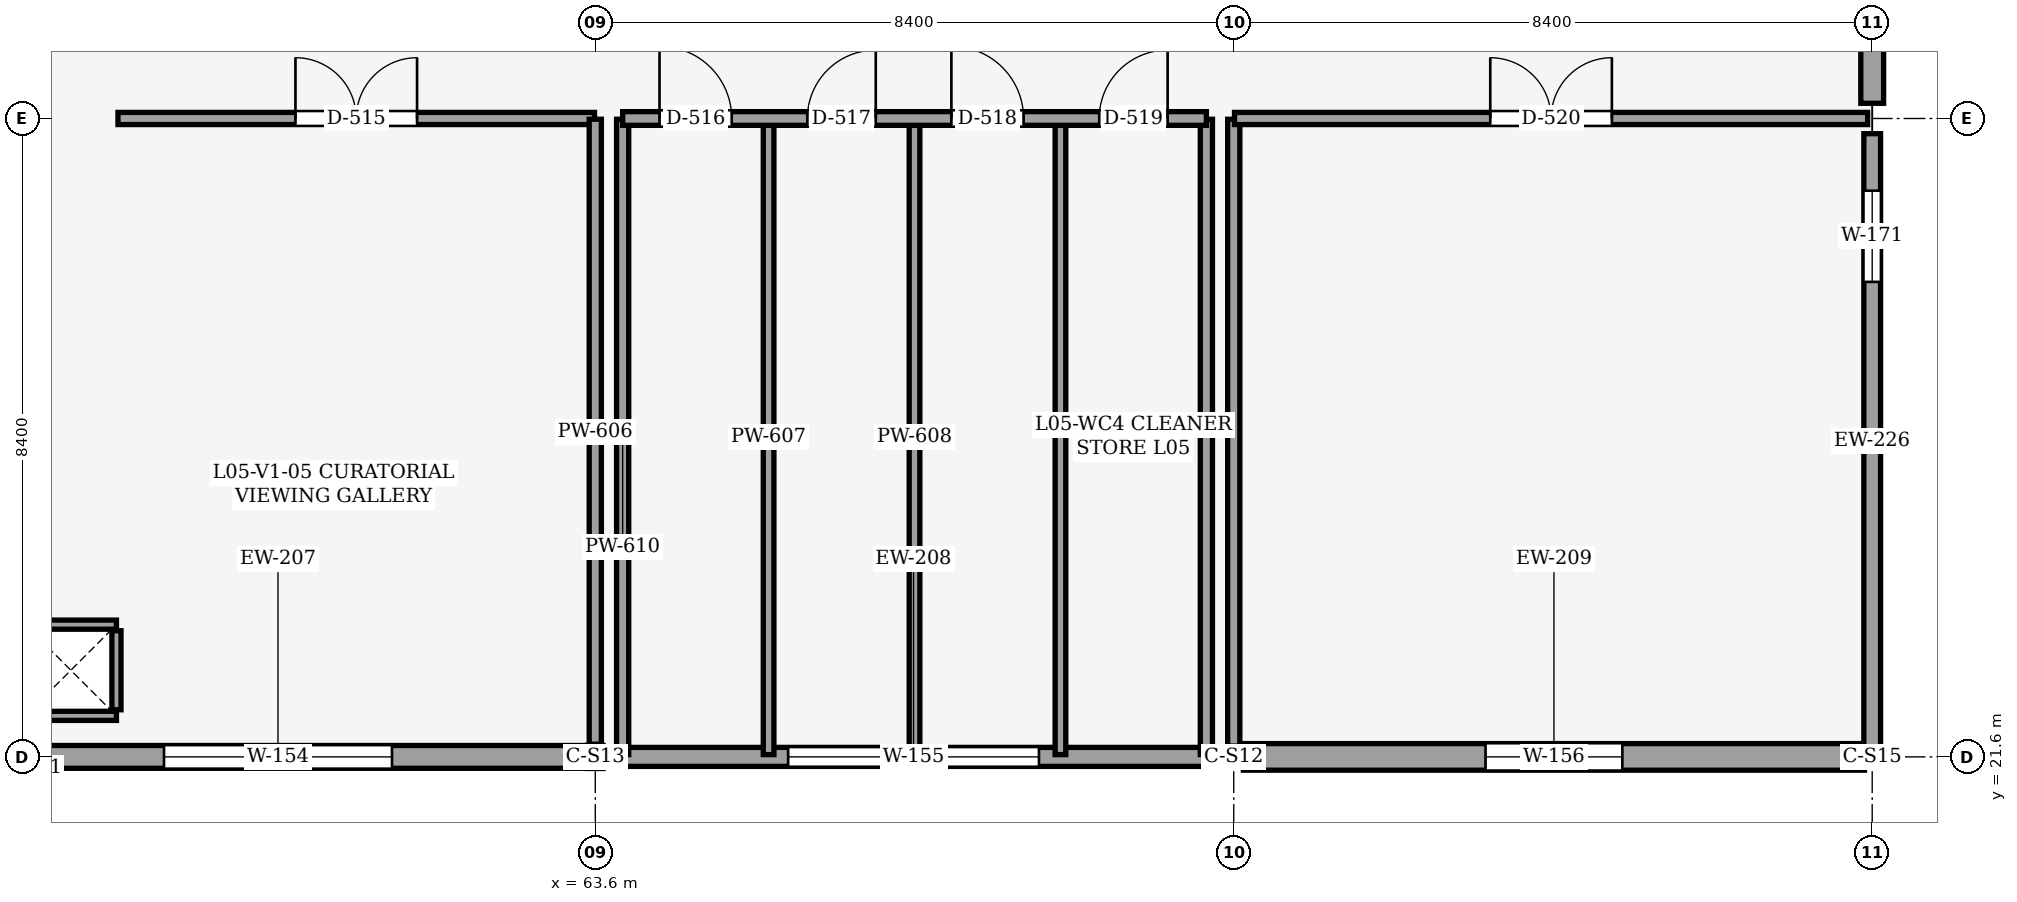
"""IFC4 building model, lengths in metres.
Left out: names, types, materials, properties, quantities, classifications, styles, units other than length and angle.
Written with IfcOpenShell. Run it as: python <this file> out.ifc"""

import sys

from ifc_helpers import new_model, si_unit, direction, frame, frame_2d, origin, origin_2d, place, context, subcontext, project, spatial, rectangle, hollow_rectangle, extrude, element, fill, save


model = new_model("IFC4")
c1 = context("Model", 3, precision=1e-05, world=origin(), true_north=direction((0.0, 1.0)))
c2 = subcontext(c1, "Body", "Model", "MODEL_VIEW")
j1 = project(units=[si_unit("LENGTHUNIT", "METRE"), si_unit("PLANEANGLEUNIT", "RADIAN")], contexts=[c1])
p1 = place(None, origin())
s1 = spatial("IfcSite", under=j1, at=p1, CompositionType="ELEMENT")
p2 = place(p1, origin())
s2 = spatial("IfcBuilding", under=s1, at=p2, CompositionType="ELEMENT")
p3 = place(p2, frame((0.0, 0.0, 24.6)))
s3 = spatial("IfcBuildingStorey", under=s2, at=p3, CompositionType="ELEMENT", Elevation=24.6)
p4 = place(p3, frame((63.6, 21.6, 0.0), z_axis=(0.0, 0.0, 1.0), x_axis=(1.0, 0.0, 0.0)))
e1 = element("IfcColumn", 1, at=p4, inside=s3, PredefinedType="COLUMN", context=c2, shape_type="SweptSolid", body=[
    extrude(hollow_rectangle(XDim=0.203, YDim=0.305, WallThickness=0.013, OuterFilletRadius=0.025, at=origin_2d()), origin(), (0.0, 0.0, 1.0), 4.8),
])
p5 = place(p3, frame((72.0, 21.6, 0.0), z_axis=(0.0, 0.0, 1.0), x_axis=(1.0, 0.0, 0.0)))
e2 = element("IfcColumn", 2, at=p5, inside=s3, PredefinedType="COLUMN", context=c2, shape_type="SweptSolid", body=[
    extrude(hollow_rectangle(XDim=0.254, YDim=0.254, WallThickness=0.013, OuterFilletRadius=0.025, at=origin_2d()), origin(), (0.0, 0.0, 1.0), 4.8),
])
p6 = place(p3, frame((80.4, 21.6, 0.0), z_axis=(0.0, 0.0, 1.0), x_axis=(1.0, 0.0, 0.0)))
e3 = element("IfcColumn", 3, at=p6, inside=s3, PredefinedType="COLUMN", context=c2, shape_type="SweptSolid", body=[
    extrude(hollow_rectangle(XDim=0.203, YDim=0.203, WallThickness=0.013, OuterFilletRadius=0.025, at=origin_2d()), origin(), (0.0, 0.0, 1.0), 4.8),
])
p7 = place(p3, frame((63.498, 21.6, 0.0), z_axis=(0.0, 0.0, 1.0), x_axis=(-1.0, 0.0, 0.0)))
e4 = element("IfcWall", 4, at=p7, inside=s3, PredefinedType="SOLIDWALL", context=c2, shape_type="SweptSolid", body=[
    extrude(rectangle(XDim=8.146, YDim=0.3, at=frame_2d((4.073, 0.0))), origin(), (0.0, 0.0, 1.0), 3.842),
])
p8 = place(p7, frame((2.573, 0.0, 0.9)))
e5 = element("IfcOpeningElement", 5, at=p8, cuts=e4, PredefinedType="OPENING", context=c2, shape_type="SweptSolid", body=[
    extrude(rectangle(XDim=3.0, YDim=1.75, at=frame_2d((1.5, 0.875))), frame((0.0, 0.16, 0.0), z_axis=(0.0, -1.0, 0.0), x_axis=(1.0, 0.0, 0.0)), (0.0, 0.0, 1.0), 0.321),
])
p9 = place(p3, frame((71.873, 21.6, 0.0), z_axis=(0.0, 0.0, 1.0), x_axis=(-1.0, 0.0, 0.0)))
e6 = element("IfcWall", 6, at=p9, inside=s3, PredefinedType="SOLIDWALL", context=c2, shape_type="SweptSolid", body=[
    extrude(rectangle(XDim=8.171, YDim=0.25, at=frame_2d((4.086, 0.0))), origin(), (0.0, 0.0, 1.0), 3.842),
])
p10 = place(p9, frame((2.436, 0.0, 0.9)))
e7 = element("IfcOpeningElement", 7, at=p10, cuts=e6, PredefinedType="OPENING", context=c2, shape_type="SweptSolid", body=[
    extrude(rectangle(XDim=3.3, YDim=1.75, at=frame_2d((1.65, 0.875))), frame((0.0, 0.135, 0.0), z_axis=(0.0, -1.0, 0.0), x_axis=(1.0, 0.0, 0.0)), (0.0, 0.0, 1.0), 0.271),
])
p11 = place(p3, frame((80.298, 21.6, 0.0), z_axis=(0.0, 0.0, 1.0), x_axis=(-1.0, 0.0, 0.0)))
e8 = element("IfcWall", 8, at=p11, inside=s3, PredefinedType="SOLIDWALL", context=c2, shape_type="SweptSolid", body=[
    extrude(rectangle(XDim=8.171, YDim=0.35, at=frame_2d((4.086, 0.0))), origin(), (0.0, 0.0, 1.0), 3.842),
])
p12 = place(p11, frame((3.186, 0.0, 0.9)))
e9 = element("IfcOpeningElement", 9, at=p12, cuts=e8, PredefinedType="OPENING", context=c2, shape_type="SweptSolid", body=[
    extrude(rectangle(XDim=1.8, YDim=0.9, at=frame_2d((0.9, 0.45))), frame((0.0, 0.185, 0.0), z_axis=(0.0, -1.0, 0.0), x_axis=(1.0, 0.0, 0.0)), (0.0, 0.0, 1.0), 0.371),
])
p13 = place(p3, frame((80.4, 29.8, 0.0), z_axis=(0.0, 0.0, 1.0), x_axis=(0.0, -1.0, 0.0)))
e10 = element("IfcWall", 10, at=p13, inside=s3, PredefinedType="SOLIDWALL", context=c2, shape_type="SweptSolid", body=[
    extrude(rectangle(XDim=8.098, YDim=0.22, at=frame_2d((4.049, 0.0))), origin(), (0.0, 0.0, 1.0), 3.524),
])
p14 = place(p13, frame((0.75, 0.0, 0.9)))
e11 = element("IfcOpeningElement", 11, at=p14, cuts=e10, PredefinedType="OPENING", context=c2, shape_type="SweptSolid", body=[
    extrude(rectangle(XDim=1.2, YDim=1.5, at=frame_2d((0.6, 0.75))), frame((0.0, 0.12, 0.0), z_axis=(0.0, -1.0, 0.0), x_axis=(1.0, 0.0, 0.0)), (0.0, 0.0, 1.0), 0.24),
])
p15 = place(p3, frame((80.4, 38.2, 0.0), z_axis=(0.0, 0.0, 1.0), x_axis=(0.0, -1.0, 0.0)))
e12 = element("IfcWall", 12, at=p15, inside=s3, PredefinedType="SOLIDWALL", context=c2, shape_type="SweptSolid", body=[
    extrude(rectangle(XDim=8.0, YDim=0.3, at=frame_2d((4.0, 0.0))), origin(), (0.0, 0.0, 1.0), 3.524),
])
p16 = place(p15, frame((3.3, 0.0, 0.9)))
e13 = element("IfcOpeningElement", 13, at=p16, cuts=e12, PredefinedType="OPENING", context=c2, shape_type="SweptSolid", body=[
    extrude(rectangle(XDim=1.4, YDim=1.75, at=frame_2d((0.7, 0.875))), frame((0.0, 0.16, 0.0), z_axis=(0.0, -1.0, 0.0), x_axis=(1.0, 0.0, 0.0)), (0.0, 0.0, 1.0), 0.321),
])
for number, where, z_axis, x_axis in (
    (14, (56.1, 22.14, 0.0), (0.0, 0.0, 1.0), (1.0, 0.0, 0.0)),
    (15, (56.1, 23.34, 0.0), (0.0, 0.0, 1.0), (1.0, 0.0, 0.0)),
):
    element("IfcWall", number, at=place(p3, frame(where, z_axis=z_axis, x_axis=x_axis)), inside=s3, PredefinedType="PARTITIONING", context=c2, shape_type="SweptSolid", body=[
        extrude(rectangle(XDim=1.2, YDim=0.12, at=frame_2d((0.6, 0.0))), origin(), (0.0, 0.0, 1.0), 4.6),
    ])
p17 = place(p3, frame((57.3, 22.22, 0.0), z_axis=(0.0, 0.0, 1.0), x_axis=(0.0, 1.0, 0.0)))
e16 = element("IfcWall", 16, at=p17, inside=s3, PredefinedType="PARTITIONING", context=c2, shape_type="SweptSolid", body=[
    extrude(rectangle(XDim=1.04, YDim=0.12, at=frame_2d((0.52, 0.0))), origin(), (0.0, 0.0, 1.0), 4.6),
])
p18 = place(p3, frame((57.32, 30.0, 0.0), z_axis=(0.0, 0.0, 1.0), x_axis=(1.0, 0.0, 0.0)))
e17 = element("IfcWall", 17, at=p18, inside=s3, PredefinedType="PARTITIONING", context=c2, shape_type="SweptSolid", body=[
    extrude(rectangle(XDim=6.27, YDim=0.16, at=frame_2d((3.135, 0.0))), origin(), (0.0, 0.0, 1.0), 4.58),
])
p19 = place(p18, frame((2.335, 0.0, 0.0)))
e18 = element("IfcOpeningElement", 18, at=p19, cuts=e17, PredefinedType="OPENING", context=c2, shape_type="SweptSolid", body=[
    extrude(rectangle(XDim=1.6, YDim=2.35, at=frame_2d((0.8, 1.175))), frame((0.0, 0.09, 0.0), z_axis=(0.0, -1.0, 0.0), x_axis=(1.0, 0.0, 0.0)), (0.0, 0.0, 1.0), 0.18),
])
p20 = place(p3, frame((63.6, 21.767, 0.0), z_axis=(0.0, 0.0, 1.0), x_axis=(0.0, 1.0, 0.0)))
e19 = element("IfcWall", 19, at=p20, inside=s3, PredefinedType="PARTITIONING", context=c2, shape_type="SweptSolid", body=[
    extrude(rectangle(XDim=8.223, YDim=0.16, at=frame_2d((4.111, 0.0))), origin(), (0.0, 0.0, 1.0), 3.524),
])
for number, where, z_axis, x_axis in (
    (20, (65.88, 21.63, 0.0), (0.0, 0.0, 1.0), (0.0, 1.0, 0.0)),
    (21, (67.8, 21.63, 0.0), (0.0, 0.0, 1.0), (0.0, 1.0, 0.0)),
    (22, (69.72, 21.63, 0.0), (0.0, 0.0, 1.0), (0.0, 1.0, 0.0)),
):
    element("IfcWall", number, at=place(p3, frame(where, z_axis=z_axis, x_axis=x_axis)), inside=s3, PredefinedType="PARTITIONING", context=c2, shape_type="SweptSolid", body=[
        extrude(rectangle(XDim=8.36, YDim=0.14, at=frame_2d((4.18, 0.0))), origin(), (0.0, 0.0, 1.0), 4.58),
    ])
for number, where, z_axis, x_axis in (
    (23, (63.96, 21.63, 0.0), (0.0, 0.0, 1.0), (0.0, 1.0, 0.0)),
    (24, (71.64, 21.63, 0.0), (0.0, 0.0, 1.0), (0.0, 1.0, 0.0)),
):
    element("IfcWall", number, at=place(p3, frame(where, z_axis=z_axis, x_axis=x_axis)), inside=s3, PredefinedType="PARTITIONING", context=c2, shape_type="SweptSolid", body=[
        extrude(rectangle(XDim=8.36, YDim=0.16, at=frame_2d((4.18, 0.0))), origin(), (0.0, 0.0, 1.0), 4.58),
    ])
p21 = place(p3, frame((63.96, 30.0, 0.0), z_axis=(0.0, 0.0, 1.0), x_axis=(1.0, 0.0, 0.0)))
e25 = element("IfcWall", 25, at=p21, inside=s3, PredefinedType="PARTITIONING", context=c2, shape_type="SweptSolid", body=[
    extrude(rectangle(XDim=7.68, YDim=0.18, at=frame_2d((3.84, 0.0))), origin(), (0.0, 0.0, 1.0), 4.58),
])
p22 = place(p21, frame((0.485, 0.0, 0.0)))
e26 = element("IfcOpeningElement", 26, at=p22, cuts=e25, PredefinedType="OPENING", context=c2, shape_type="SweptSolid", body=[
    extrude(rectangle(XDim=0.95, YDim=2.1, at=frame_2d((0.475, 1.05))), frame((0.0, 0.1, 0.0), z_axis=(0.0, -1.0, 0.0), x_axis=(1.0, 0.0, 0.0)), (0.0, 0.0, 1.0), 0.2),
])
p23 = place(p21, frame((2.43, 0.0, 0.0)))
e27 = element("IfcOpeningElement", 27, at=p23, cuts=e25, PredefinedType="OPENING", context=c2, shape_type="SweptSolid", body=[
    extrude(rectangle(XDim=0.9, YDim=2.1, at=frame_2d((0.45, 1.05))), frame((0.0, 0.1, 0.0), z_axis=(0.0, -1.0, 0.0), x_axis=(1.0, 0.0, 0.0)), (0.0, 0.0, 1.0), 0.2),
])
p24 = place(p21, frame((4.325, 0.0, 0.0)))
e28 = element("IfcOpeningElement", 28, at=p24, cuts=e25, PredefinedType="OPENING", context=c2, shape_type="SweptSolid", body=[
    extrude(rectangle(XDim=0.95, YDim=2.1, at=frame_2d((0.475, 1.05))), frame((0.0, 0.1, 0.0), z_axis=(0.0, -1.0, 0.0), x_axis=(1.0, 0.0, 0.0)), (0.0, 0.0, 1.0), 0.2),
])
p25 = place(p21, frame((6.27, 0.0, 0.0)))
e29 = element("IfcOpeningElement", 29, at=p25, cuts=e25, PredefinedType="OPENING", context=c2, shape_type="SweptSolid", body=[
    extrude(rectangle(XDim=0.9, YDim=2.1, at=frame_2d((0.45, 1.05))), frame((0.0, 0.1, 0.0), z_axis=(0.0, -1.0, 0.0), x_axis=(1.0, 0.0, 0.0)), (0.0, 0.0, 1.0), 0.2),
])
p26 = place(p3, frame((72.0, 21.742, 0.0), z_axis=(0.0, 0.0, 1.0), x_axis=(0.0, 1.0, 0.0)))
e30 = element("IfcWall", 30, at=p26, inside=s3, PredefinedType="PARTITIONING", context=c2, shape_type="SweptSolid", body=[
    extrude(rectangle(XDim=8.248, YDim=0.16, at=frame_2d((4.124, 0.0))), origin(), (0.0, 0.0, 1.0), 3.524),
])
p27 = place(p3, frame((72.01, 30.0, 0.0), z_axis=(0.0, 0.0, 1.0), x_axis=(1.0, 0.0, 0.0)))
e31 = element("IfcWall", 31, at=p27, inside=s3, PredefinedType="PARTITIONING", context=c2, shape_type="SweptSolid", body=[
    extrude(rectangle(XDim=8.33, YDim=0.16, at=frame_2d((4.165, 0.0))), origin(), (0.0, 0.0, 1.0), 4.58),
])
p28 = place(p27, frame((3.365, 0.0, 0.0)))
e32 = element("IfcOpeningElement", 32, at=p28, cuts=e31, PredefinedType="OPENING", context=c2, shape_type="SweptSolid", body=[
    extrude(rectangle(XDim=1.6, YDim=2.35, at=frame_2d((0.8, 1.175))), frame((0.0, 0.09, 0.0), z_axis=(0.0, -1.0, 0.0), x_axis=(1.0, 0.0, 0.0)), (0.0, 0.0, 1.0), 0.18),
])
p29 = place(p8, origin())
e33 = element("IfcWindow", 33, at=p29, inside=s3, PartitioningType="SINGLE_PANEL", PredefinedType="WINDOW", context=c2, shape_type="SweptSolid", body=[
    extrude(rectangle(XDim=3.0, YDim=1.75, at=frame_2d((1.5, 0.875))), frame((0.0, 0.03, 0.0), z_axis=(0.0, -1.0, 0.0), x_axis=(1.0, 0.0, 0.0)), (0.0, 0.0, 1.0), 0.06),
])
fill(e5, e33)
p30 = place(p10, origin())
e34 = element("IfcWindow", 34, at=p30, inside=s3, PartitioningType="SINGLE_PANEL", PredefinedType="WINDOW", context=c2, shape_type="SweptSolid", body=[
    extrude(rectangle(XDim=3.3, YDim=1.75, at=frame_2d((1.65, 0.875))), frame((0.0, 0.03, 0.0), z_axis=(0.0, -1.0, 0.0), x_axis=(1.0, 0.0, 0.0)), (0.0, 0.0, 1.0), 0.06),
])
fill(e7, e34)
p31 = place(p12, origin())
e35 = element("IfcWindow", 35, at=p31, inside=s3, PartitioningType="SINGLE_PANEL", PredefinedType="WINDOW", context=c2, shape_type="SweptSolid", body=[
    extrude(rectangle(XDim=1.8, YDim=0.9, at=frame_2d((0.9, 0.45))), frame((0.0, 0.03, 0.0), z_axis=(0.0, -1.0, 0.0), x_axis=(1.0, 0.0, 0.0)), (0.0, 0.0, 1.0), 0.06),
])
fill(e9, e35)
p32 = place(p14, origin())
e36 = element("IfcWindow", 36, at=p32, inside=s3, PartitioningType="SINGLE_PANEL", PredefinedType="WINDOW", context=c2, shape_type="SweptSolid", body=[
    extrude(rectangle(XDim=1.2, YDim=1.5, at=frame_2d((0.6, 0.75))), frame((0.0, 0.03, 0.0), z_axis=(0.0, -1.0, 0.0), x_axis=(1.0, 0.0, 0.0)), (0.0, 0.0, 1.0), 0.06),
])
fill(e11, e36)
p33 = place(p19, origin())
e37 = element("IfcDoor", 37, at=p33, inside=s3, OperationType="DOUBLE_DOOR_SINGLE_SWING", PredefinedType="DOOR", context=c2, shape_type="SweptSolid", body=[
    extrude(rectangle(XDim=1.6, YDim=2.35, at=frame_2d((0.8, 1.175))), frame((0.0, 0.025, 0.0), z_axis=(0.0, -1.0, 0.0), x_axis=(1.0, 0.0, 0.0)), (0.0, 0.0, 1.0), 0.05),
])
fill(e18, e37)
p34 = place(p22, origin())
e38 = element("IfcDoor", 38, at=p34, inside=s3, OperationType="SINGLE_SWING_LEFT", PredefinedType="DOOR", context=c2, shape_type="SweptSolid", body=[
    extrude(rectangle(XDim=0.95, YDim=2.1, at=frame_2d((0.475, 1.05))), frame((0.0, 0.025, 0.0), z_axis=(0.0, -1.0, 0.0), x_axis=(1.0, 0.0, 0.0)), (0.0, 0.0, 1.0), 0.05),
])
fill(e26, e38)
p35 = place(p23, origin())
e39 = element("IfcDoor", 39, at=p35, inside=s3, OperationType="SINGLE_SWING_RIGHT", PredefinedType="DOOR", context=c2, shape_type="SweptSolid", body=[
    extrude(rectangle(XDim=0.9, YDim=2.1, at=frame_2d((0.45, 1.05))), frame((0.0, 0.025, 0.0), z_axis=(0.0, -1.0, 0.0), x_axis=(1.0, 0.0, 0.0)), (0.0, 0.0, 1.0), 0.05),
])
fill(e27, e39)
p36 = place(p24, origin())
e40 = element("IfcDoor", 40, at=p36, inside=s3, OperationType="SINGLE_SWING_LEFT", PredefinedType="DOOR", context=c2, shape_type="SweptSolid", body=[
    extrude(rectangle(XDim=0.95, YDim=2.1, at=frame_2d((0.475, 1.05))), frame((0.0, 0.025, 0.0), z_axis=(0.0, -1.0, 0.0), x_axis=(1.0, 0.0, 0.0)), (0.0, 0.0, 1.0), 0.05),
])
fill(e28, e40)
p37 = place(p25, origin())
e41 = element("IfcDoor", 41, at=p37, inside=s3, OperationType="SINGLE_SWING_RIGHT", PredefinedType="DOOR", context=c2, shape_type="SweptSolid", body=[
    extrude(rectangle(XDim=0.9, YDim=2.1, at=frame_2d((0.45, 1.05))), frame((0.0, 0.025, 0.0), z_axis=(0.0, -1.0, 0.0), x_axis=(1.0, 0.0, 0.0)), (0.0, 0.0, 1.0), 0.05),
])
fill(e29, e41)
p38 = place(p28, origin())
e42 = element("IfcDoor", 42, at=p38, inside=s3, OperationType="DOUBLE_DOOR_SINGLE_SWING", PredefinedType="DOOR", context=c2, shape_type="SweptSolid", body=[
    extrude(rectangle(XDim=1.6, YDim=2.35, at=frame_2d((0.8, 1.175))), frame((0.0, 0.025, 0.0), z_axis=(0.0, -1.0, 0.0), x_axis=(1.0, 0.0, 0.0)), (0.0, 0.0, 1.0), 0.05),
])
fill(e32, e42)
save(model, sys.argv[1])
